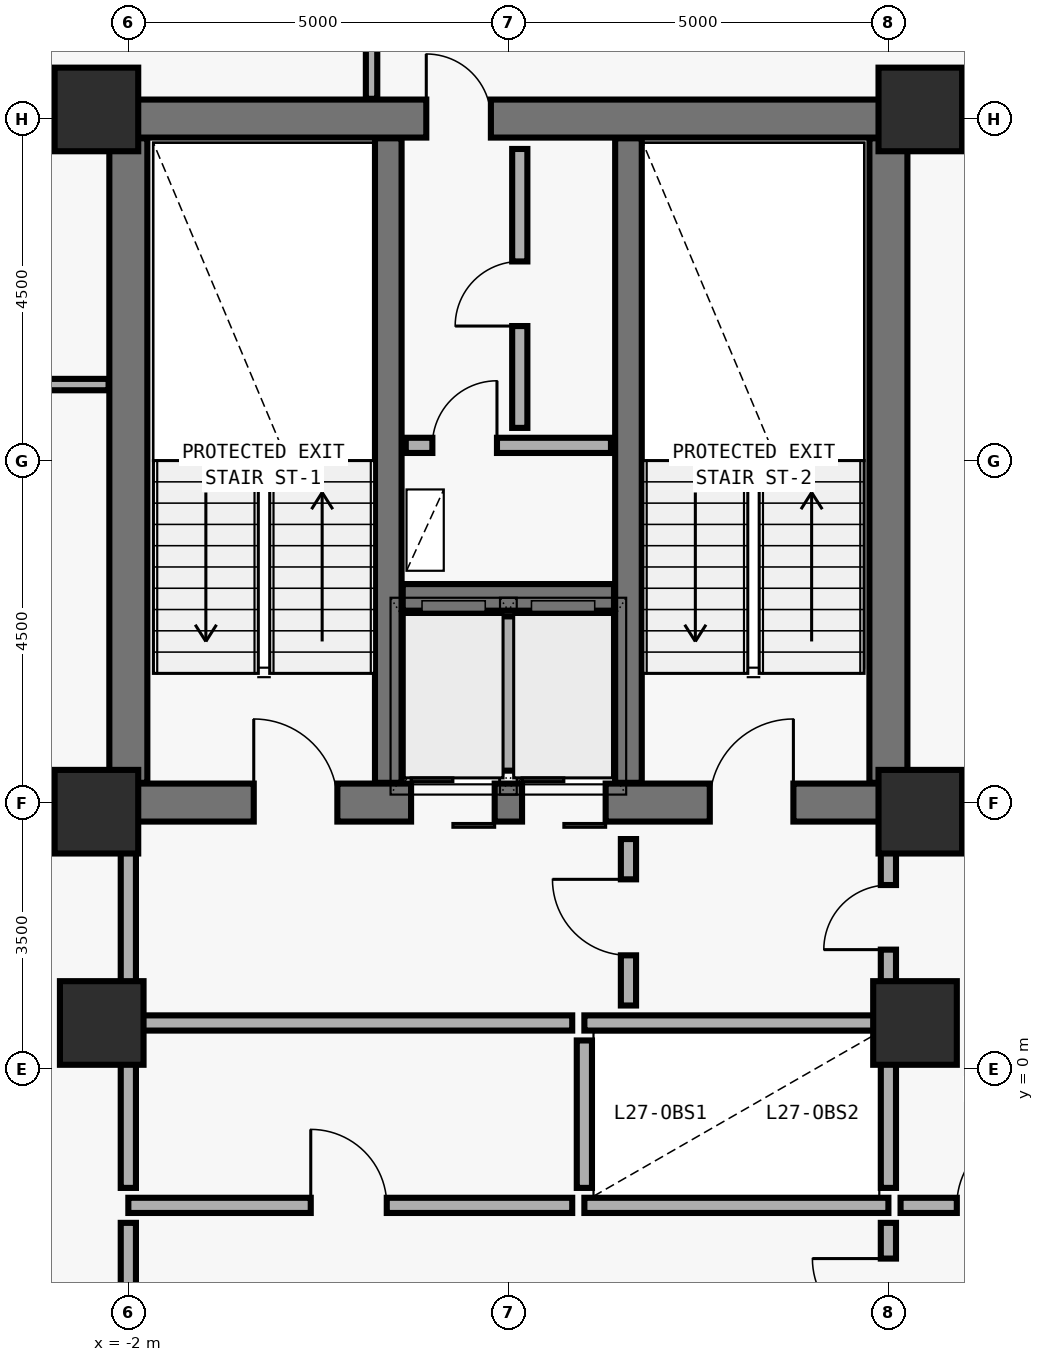
"""IFC4 building model, lengths in metres.
Left out: names, types, materials, properties, quantities, classifications, styles, units other than length and angle.
Written with IfcOpenShell. Run it as: python <this file> out.ifc"""

import sys

from ifc_helpers import new_model, si_unit, direction, frame, frame_2d, origin, origin_2d, place, context, subcontext, project, spatial, rectangle, extrude, element, fill, save


model = new_model("IFC4")
c1 = context("Model", 3, precision=1e-05, world=origin(), true_north=direction((0.0, 1.0)))
c2 = subcontext(c1, "Body", "Model", "MODEL_VIEW")
j1 = project(units=[si_unit("LENGTHUNIT", "METRE"), si_unit("PLANEANGLEUNIT", "RADIAN")], contexts=[c1])
p1 = place(None, origin())
s1 = spatial("IfcSite", under=j1, at=p1, CompositionType="ELEMENT")
p2 = place(p1, origin())
s2 = spatial("IfcBuilding", under=s1, at=p2, CompositionType="ELEMENT")
p3 = place(p2, frame((0.0, 0.0, 111.0)))
s3 = spatial("IfcBuildingStorey", under=s2, at=p3, CompositionType="ELEMENT", Elevation=111.0)
p4 = place(p3, frame((-2.0, 3.5, 0.0), z_axis=(0.0, 0.0, 1.0), x_axis=(1.0, 0.0, 0.0)))
e1 = element("IfcWall", 1, at=p4, inside=s3, PredefinedType="SHEAR", context=c2, shape_type="SweptSolid", body=[
    extrude(rectangle(XDim=10.0, YDim=0.5, at=frame_2d((5.0, 0.0))), origin(), (0.0, 0.0, 1.0), 3.892),
])
p5 = place(p4, frame((1.65, 0.0, 0.0)))
e2 = element("IfcOpeningElement", 2, at=p5, cuts=e1, PredefinedType="OPENING", context=c2, shape_type="SweptSolid", body=[
    extrude(rectangle(XDim=1.1, YDim=2.15, at=frame_2d((0.55, 1.075))), frame((0.0, 0.26, 0.0), z_axis=(0.0, -1.0, 0.0), x_axis=(1.0, 0.0, 0.0)), (0.0, 0.0, 1.0), 0.52),
])
p6 = place(p4, frame((7.65, 0.0, 0.0)))
e3 = element("IfcOpeningElement", 3, at=p6, cuts=e1, PredefinedType="OPENING", context=c2, shape_type="SweptSolid", body=[
    extrude(rectangle(XDim=1.1, YDim=2.15, at=frame_2d((0.55, 1.075))), frame((0.0, 0.26, 0.0), z_axis=(0.0, -1.0, 0.0), x_axis=(1.0, 0.0, 0.0)), (0.0, 0.0, 1.0), 0.52),
])
p7 = place(p4, frame((3.72, 0.0, 0.0)))
e4 = element("IfcOpeningElement", 4, at=p7, cuts=e1, PredefinedType="OPENING", context=c2, shape_type="SweptSolid", body=[
    extrude(rectangle(XDim=1.1, YDim=2.2, at=frame_2d((0.55, 1.1))), frame((0.0, 0.26, 0.0), z_axis=(0.0, -1.0, 0.0), x_axis=(1.0, 0.0, 0.0)), (0.0, 0.0, 1.0), 0.52),
])
p8 = place(p4, frame((5.18, 0.0, 0.0)))
e5 = element("IfcOpeningElement", 5, at=p8, cuts=e1, PredefinedType="OPENING", context=c2, shape_type="SweptSolid", body=[
    extrude(rectangle(XDim=1.1, YDim=2.2, at=frame_2d((0.55, 1.1))), frame((0.0, 0.26, 0.0), z_axis=(0.0, -1.0, 0.0), x_axis=(1.0, 0.0, 0.0)), (0.0, 0.0, 1.0), 0.52),
])
p9 = place(p3, frame((-2.0, 12.5, 0.0), z_axis=(0.0, 0.0, 1.0), x_axis=(1.0, 0.0, 0.0)))
e6 = element("IfcWall", 6, at=p9, inside=s3, PredefinedType="SHEAR", context=c2, shape_type="SweptSolid", body=[
    extrude(rectangle(XDim=10.0, YDim=0.5, at=frame_2d((5.0, 0.0))), origin(), (0.0, 0.0, 1.0), 3.892),
])
p10 = place(p9, frame((3.92, 0.0, 0.0)))
e7 = element("IfcOpeningElement", 7, at=p10, cuts=e6, PredefinedType="OPENING", context=c2, shape_type="SweptSolid", body=[
    extrude(rectangle(XDim=0.85, YDim=2.1, at=frame_2d((0.425, 1.05))), frame((0.0, 0.26, 0.0), z_axis=(0.0, -1.0, 0.0), x_axis=(1.0, 0.0, 0.0)), (0.0, 0.0, 1.0), 0.52),
])
for number, where, z_axis, x_axis in (
    (8, (-2.0, 3.76, 0.0), (0.0, 0.0, 1.0), (0.0, 1.0, 0.0)),
    (9, (8.0, 3.76, 0.0), (0.0, 0.0, 1.0), (0.0, 1.0, 0.0)),
):
    element("IfcWall", number, at=place(p3, frame(where, z_axis=z_axis, x_axis=x_axis)), inside=s3, PredefinedType="SHEAR", context=c2, shape_type="SweptSolid", body=[
        extrude(rectangle(XDim=8.48, YDim=0.5, at=frame_2d((4.24, 0.0))), origin(), (0.0, 0.0, 1.0), 3.892),
    ])
for number, where, z_axis, x_axis in (
    (10, (1.42, 3.76, 0.0), (0.0, 0.0, 1.0), (0.0, 1.0, 0.0)),
    (11, (4.58, 3.76, 0.0), (0.0, 0.0, 1.0), (0.0, 1.0, 0.0)),
):
    element("IfcWall", number, at=place(p3, frame(where, z_axis=z_axis, x_axis=x_axis)), inside=s3, PredefinedType="SHEAR", context=c2, shape_type="SweptSolid", body=[
        extrude(rectangle(XDim=8.48, YDim=0.35, at=frame_2d((4.24, 0.0))), origin(), (0.0, 0.0, 1.0), 3.892),
    ])
p11 = place(p3, frame((1.61, 6.2, 0.0), z_axis=(0.0, 0.0, 1.0), x_axis=(1.0, 0.0, 0.0)))
e12 = element("IfcWall", 12, at=p11, inside=s3, PredefinedType="SHEAR", context=c2, shape_type="SweptSolid", body=[
    extrude(rectangle(XDim=2.78, YDim=0.35, at=frame_2d((1.39, 0.0))), origin(), (0.0, 0.0, 1.0), 3.892),
])
for number, where, z_axis, x_axis in (
    (13, (-2.42, 12.62, 0.0), (0.0, 0.0, 1.0), (1.0, 0.0, 0.0)),
    (14, (8.42, 12.62, 0.0), (0.0, 0.0, 1.0), (1.0, 0.0, 0.0)),
    (15, (-2.42, 3.38, 0.0), (0.0, 0.0, 1.0), (1.0, 0.0, 0.0)),
    (16, (8.42, 3.38, 0.0), (0.0, 0.0, 1.0), (1.0, 0.0, 0.0)),
    (17, (-2.35, 0.6, 0.0), (0.0, 0.0, 1.0), (1.0, 0.0, 0.0)),
    (18, (8.35, 0.6, 0.0), (0.0, 0.0, 1.0), (1.0, 0.0, 0.0)),
):
    element("IfcColumn", number, at=place(p3, frame(where, z_axis=z_axis, x_axis=x_axis)), inside=s3, PredefinedType="COLUMN", context=c2, shape_type="SweptSolid", body=[
        extrude(rectangle(XDim=1.1, YDim=1.1, at=origin_2d()), origin(), (0.0, 0.0, 1.0), 3.875),
    ])
p12 = place(p3, frame((3.0, 3.92, 0.0), z_axis=(0.0, 0.0, 1.0), x_axis=(0.0, 1.0, 0.0)))
e19 = element("IfcWall", 19, at=p12, inside=s3, PredefinedType="SOLIDWALL", context=c2, shape_type="SweptSolid", body=[
    extrude(rectangle(XDim=2.03, YDim=0.2, at=frame_2d((1.015, 0.0))), origin(), (0.0, 0.0, 1.0), 3.64),
])
p13 = place(p3, frame((4.0, 0.6, 0.0), z_axis=(0.0, 0.0, 1.0), x_axis=(1.0, 0.0, 0.0)))
e20 = element("IfcWall", 20, at=p13, inside=s3, PredefinedType="SOLIDWALL", context=c2, shape_type="SweptSolid", body=[
    extrude(rectangle(XDim=3.88, YDim=0.2, at=frame_2d((1.94, 0.0))), origin(), (0.0, 0.0, 1.0), 3.172),
])
p14 = place(p3, frame((4.0, -1.8, 0.0), z_axis=(0.0, 0.0, 1.0), x_axis=(1.0, 0.0, 0.0)))
e21 = element("IfcWall", 21, at=p14, inside=s3, PredefinedType="SOLIDWALL", context=c2, shape_type="SweptSolid", body=[
    extrude(rectangle(XDim=4.0, YDim=0.2, at=frame_2d((2.0, 0.0))), origin(), (0.0, 0.0, 1.0), 3.64),
])
p15 = place(p3, frame((4.0, -1.57, 0.0), z_axis=(0.0, 0.0, 1.0), x_axis=(0.0, 1.0, 0.0)))
e22 = element("IfcWall", 22, at=p15, inside=s3, PredefinedType="SOLIDWALL", context=c2, shape_type="SweptSolid", body=[
    extrude(rectangle(XDim=1.94, YDim=0.2, at=frame_2d((0.97, 0.0))), origin(), (0.0, 0.0, 1.0), 3.64),
])
p16 = place(p3, frame((8.0, -1.57, 0.0), z_axis=(0.0, 0.0, 1.0), x_axis=(0.0, 1.0, 0.0)))
e23 = element("IfcWall", 23, at=p16, inside=s3, PredefinedType="SOLIDWALL", context=c2, shape_type="SweptSolid", body=[
    extrude(rectangle(XDim=2.05, YDim=0.2, at=frame_2d((1.025, 0.0))), origin(), (0.0, 0.0, 1.0), 3.072),
])
p17 = place(p3, frame((1.65, 8.2, 0.0), z_axis=(0.0, 0.0, 1.0), x_axis=(1.0, 0.0, 0.0)))
e24 = element("IfcWall", 24, at=p17, inside=s3, PredefinedType="MOVABLE", context=c2, shape_type="SweptSolid", body=[
    extrude(rectangle(XDim=2.7, YDim=0.2, at=frame_2d((1.35, 0.0))), origin(), (0.0, 0.0, 1.0), 3.64),
])
p18 = place(p17, frame((0.35, 0.0, 0.0)))
e25 = element("IfcOpeningElement", 25, at=p18, cuts=e24, PredefinedType="OPENING", context=c2, shape_type="SweptSolid", body=[
    extrude(rectangle(XDim=0.85, YDim=2.1, at=frame_2d((0.425, 1.05))), frame((0.0, 0.11, 0.0), z_axis=(0.0, -1.0, 0.0), x_axis=(1.0, 0.0, 0.0)), (0.0, 0.0, 1.0), 0.22),
])
p19 = place(p3, frame((3.15, 8.43, 0.0), z_axis=(0.0, 0.0, 1.0), x_axis=(0.0, 1.0, 0.0)))
e26 = element("IfcWall", 26, at=p19, inside=s3, PredefinedType="MOVABLE", context=c2, shape_type="SweptSolid", body=[
    extrude(rectangle(XDim=3.67, YDim=0.2, at=frame_2d((1.835, 0.0))), origin(), (0.0, 0.0, 1.0), 3.64),
])
p20 = place(p19, frame((1.34, 0.0, 0.0)))
e27 = element("IfcOpeningElement", 27, at=p20, cuts=e26, PredefinedType="OPENING", context=c2, shape_type="SweptSolid", body=[
    extrude(rectangle(XDim=0.85, YDim=2.1, at=frame_2d((0.425, 1.05))), frame((0.0, 0.11, 0.0), z_axis=(0.0, -1.0, 0.0), x_axis=(1.0, 0.0, 0.0)), (0.0, 0.0, 1.0), 0.22),
])
p21 = place(p3, frame((4.58, 0.83, 0.0), z_axis=(0.0, 0.0, 1.0), x_axis=(0.0, 1.0, 0.0)))
e28 = element("IfcWall", 28, at=p21, inside=s3, PredefinedType="MOVABLE", context=c2, shape_type="SweptSolid", body=[
    extrude(rectangle(XDim=2.19, YDim=0.2, at=frame_2d((1.095, 0.0))), origin(), (0.0, 0.0, 1.0), 3.64),
])
p22 = place(p21, frame((0.66, 0.0, 0.0)))
e29 = element("IfcOpeningElement", 29, at=p22, cuts=e28, PredefinedType="OPENING", context=c2, shape_type="SweptSolid", body=[
    extrude(rectangle(XDim=1.0, YDim=2.1, at=frame_2d((0.5, 1.05))), frame((0.0, 0.11, 0.0), z_axis=(0.0, -1.0, 0.0), x_axis=(1.0, 0.0, 0.0)), (0.0, 0.0, 1.0), 0.22),
])
p23 = place(p3, frame((8.0, 0.72, 0.0), z_axis=(0.0, 0.0, 1.0), x_axis=(0.0, 1.0, 0.0)))
e30 = element("IfcWall", 30, at=p23, inside=s3, PredefinedType="MOVABLE", context=c2, shape_type="SweptSolid", body=[
    extrude(rectangle(XDim=2.3, YDim=0.2, at=frame_2d((1.15, 0.0))), origin(), (0.0, 0.0, 1.0), 2.872),
])
p24 = place(p23, frame((0.845, 0.0, 0.0)))
e31 = element("IfcOpeningElement", 31, at=p24, cuts=e30, PredefinedType="OPENING", context=c2, shape_type="SweptSolid", body=[
    extrude(rectangle(XDim=0.85, YDim=2.1, at=frame_2d((0.425, 1.05))), frame((0.0, 0.11, 0.0), z_axis=(0.0, -1.0, 0.0), x_axis=(1.0, 0.0, 0.0)), (0.0, 0.0, 1.0), 0.22),
])
p25 = place(p3, frame((8.0, -3.97, 0.0), z_axis=(0.0, 0.0, 1.0), x_axis=(0.0, 1.0, 0.0)))
e32 = element("IfcWall", 32, at=p25, inside=s3, PredefinedType="MOVABLE", context=c2, shape_type="SweptSolid", body=[
    extrude(rectangle(XDim=1.94, YDim=0.2, at=frame_2d((0.97, 0.0))), origin(), (0.0, 0.0, 1.0), 3.072),
])
p26 = place(p25, frame((0.47, 0.0, 0.0)))
e33 = element("IfcOpeningElement", 33, at=p26, cuts=e32, PredefinedType="OPENING", context=c2, shape_type="SweptSolid", body=[
    extrude(rectangle(XDim=1.0, YDim=2.1, at=frame_2d((0.5, 1.05))), frame((0.0, 0.11, 0.0), z_axis=(0.0, -1.0, 0.0), x_axis=(1.0, 0.0, 0.0)), (0.0, 0.0, 1.0), 0.22),
])
p27 = place(p3, frame((-2.0, -1.8, 0.0), z_axis=(0.0, 0.0, 1.0), x_axis=(1.0, 0.0, 0.0)))
e34 = element("IfcWall", 34, at=p27, inside=s3, PredefinedType="MOVABLE", context=c2, shape_type="SweptSolid", body=[
    extrude(rectangle(XDim=5.84, YDim=0.2, at=frame_2d((2.92, 0.0))), origin(), (0.0, 0.0, 1.0), 3.64),
])
p28 = place(p27, frame((2.4, 0.0, 0.0)))
e35 = element("IfcOpeningElement", 35, at=p28, cuts=e34, PredefinedType="OPENING", context=c2, shape_type="SweptSolid", body=[
    extrude(rectangle(XDim=1.0, YDim=2.1, at=frame_2d((0.5, 1.05))), frame((0.0, 0.11, 0.0), z_axis=(0.0, -1.0, 0.0), x_axis=(1.0, 0.0, 0.0)), (0.0, 0.0, 1.0), 0.22),
])
p29 = place(p3, frame((8.16, -1.8, 0.0), z_axis=(0.0, 0.0, 1.0), x_axis=(1.0, 0.0, 0.0)))
e36 = element("IfcWall", 36, at=p29, inside=s3, PredefinedType="MOVABLE", context=c2, shape_type="SweptSolid", body=[
    extrude(rectangle(XDim=2.64, YDim=0.2, at=frame_2d((1.32, 0.0))), origin(), (0.0, 0.0, 1.0), 3.64),
])
p30 = place(p29, frame((0.74, 0.0, 0.0)))
e37 = element("IfcOpeningElement", 37, at=p30, cuts=e36, PredefinedType="OPENING", context=c2, shape_type="SweptSolid", body=[
    extrude(rectangle(XDim=1.0, YDim=2.1, at=frame_2d((0.5, 1.05))), frame((0.0, 0.11, 0.0), z_axis=(0.0, -1.0, 0.0), x_axis=(1.0, 0.0, 0.0)), (0.0, 0.0, 1.0), 0.22),
])
p31 = place(p3, frame((-1.88, 0.6, 0.0), z_axis=(0.0, 0.0, 1.0), x_axis=(1.0, 0.0, 0.0)))
e38 = element("IfcWall", 38, at=p31, inside=s3, PredefinedType="MOVABLE", context=c2, shape_type="SweptSolid", body=[
    extrude(rectangle(XDim=5.72, YDim=0.2, at=frame_2d((2.86, 0.0))), origin(), (0.0, 0.0, 1.0), 3.172),
])
p32 = place(p3, frame((-2.0, 0.72, 0.0), z_axis=(0.0, 0.0, 1.0), x_axis=(0.0, 1.0, 0.0)))
e39 = element("IfcWall", 39, at=p32, inside=s3, PredefinedType="MOVABLE", context=c2, shape_type="SweptSolid", body=[
    extrude(rectangle(XDim=2.3, YDim=0.2, at=frame_2d((1.15, 0.0))), origin(), (0.0, 0.0, 1.0), 2.872),
])
p33 = place(p3, frame((-2.0, -3.97, 0.0), z_axis=(0.0, 0.0, 1.0), x_axis=(0.0, 1.0, 0.0)))
e40 = element("IfcWall", 40, at=p33, inside=s3, PredefinedType="MOVABLE", context=c2, shape_type="SweptSolid", body=[
    extrude(rectangle(XDim=1.94, YDim=0.2, at=frame_2d((0.97, 0.0))), origin(), (0.0, 0.0, 1.0), 3.022),
])
p34 = place(p3, frame((-2.0, -1.57, 0.0), z_axis=(0.0, 0.0, 1.0), x_axis=(0.0, 1.0, 0.0)))
e41 = element("IfcWall", 41, at=p34, inside=s3, PredefinedType="MOVABLE", context=c2, shape_type="SweptSolid", body=[
    extrude(rectangle(XDim=2.05, YDim=0.2, at=frame_2d((1.025, 0.0))), origin(), (0.0, 0.0, 1.0), 3.022),
])
p35 = place(p3, frame((-4.465, 9.0, 0.0), z_axis=(0.0, 0.0, 1.0), x_axis=(1.0, 0.0, 0.0)))
e42 = element("IfcWall", 42, at=p35, inside=s3, PredefinedType="PARTITIONING", context=c2, shape_type="SweptSolid", body=[
    extrude(rectangle(XDim=2.205, YDim=0.15, at=frame_2d((1.103, 0.0))), origin(), (0.0, 0.0, 1.0), 3.64),
])
p36 = place(p3, frame((1.2, 14.615, 0.0), z_axis=(0.0, 0.0, 1.0), x_axis=(0.0, -1.0, 0.0)))
e43 = element("IfcWall", 43, at=p36, inside=s3, PredefinedType="PARTITIONING", context=c2, shape_type="SweptSolid", body=[
    extrude(rectangle(XDim=1.855, YDim=0.15, at=frame_2d((0.927, 0.0))), origin(), (0.0, 0.0, 1.0), 3.64),
])
p37 = place(p5, origin())
e44 = element("IfcDoor", 44, at=p37, inside=s3, OperationType="SINGLE_SWING_LEFT", PredefinedType="DOOR", context=c2, shape_type="SweptSolid", body=[
    extrude(rectangle(XDim=1.1, YDim=2.15, at=frame_2d((0.55, 1.075))), frame((0.0, 0.025, 0.0), z_axis=(0.0, -1.0, 0.0), x_axis=(1.0, 0.0, 0.0)), (0.0, 0.0, 1.0), 0.05),
])
fill(e2, e44)
p38 = place(p6, origin())
e45 = element("IfcDoor", 45, at=p38, inside=s3, OperationType="SINGLE_SWING_RIGHT", PredefinedType="DOOR", context=c2, shape_type="SweptSolid", body=[
    extrude(rectangle(XDim=1.1, YDim=2.15, at=frame_2d((0.55, 1.075))), frame((0.0, 0.025, 0.0), z_axis=(0.0, -1.0, 0.0), x_axis=(1.0, 0.0, 0.0)), (0.0, 0.0, 1.0), 0.05),
])
fill(e3, e45)
p39 = place(p7, origin())
e46 = element("IfcDoor", 46, at=p39, inside=s3, OperationType="DOUBLE_DOOR_SLIDING", PredefinedType="DOOR", context=c2, shape_type="SweptSolid", body=[
    extrude(rectangle(XDim=1.1, YDim=2.2, at=frame_2d((0.55, 1.1))), frame((0.0, 0.025, 0.0), z_axis=(0.0, -1.0, 0.0), x_axis=(1.0, 0.0, 0.0)), (0.0, 0.0, 1.0), 0.05),
])
fill(e4, e46)
p40 = place(p8, origin())
e47 = element("IfcDoor", 47, at=p40, inside=s3, OperationType="DOUBLE_DOOR_SLIDING", PredefinedType="DOOR", context=c2, shape_type="SweptSolid", body=[
    extrude(rectangle(XDim=1.1, YDim=2.2, at=frame_2d((0.55, 1.1))), frame((0.0, 0.025, 0.0), z_axis=(0.0, -1.0, 0.0), x_axis=(1.0, 0.0, 0.0)), (0.0, 0.0, 1.0), 0.05),
])
fill(e5, e47)
p41 = place(p10, origin())
e48 = element("IfcDoor", 48, at=p41, inside=s3, OperationType="SINGLE_SWING_LEFT", PredefinedType="DOOR", context=c2, shape_type="SweptSolid", body=[
    extrude(rectangle(XDim=0.85, YDim=2.1, at=frame_2d((0.425, 1.05))), frame((0.0, 0.025, 0.0), z_axis=(0.0, -1.0, 0.0), x_axis=(1.0, 0.0, 0.0)), (0.0, 0.0, 1.0), 0.05),
])
fill(e7, e48)
p42 = place(p18, origin())
e49 = element("IfcDoor", 49, at=p42, inside=s3, OperationType="SINGLE_SWING_RIGHT", PredefinedType="DOOR", context=c2, shape_type="SweptSolid", body=[
    extrude(rectangle(XDim=0.85, YDim=2.1, at=frame_2d((0.425, 1.05))), frame((0.0, 0.025, 0.0), z_axis=(0.0, -1.0, 0.0), x_axis=(1.0, 0.0, 0.0)), (0.0, 0.0, 1.0), 0.05),
])
fill(e25, e49)
p43 = place(p20, origin())
e50 = element("IfcDoor", 50, at=p43, inside=s3, OperationType="SINGLE_SWING_LEFT", PredefinedType="DOOR", context=c2, shape_type="SweptSolid", body=[
    extrude(rectangle(XDim=0.85, YDim=2.1, at=frame_2d((0.425, 1.05))), frame((0.0, 0.025, 0.0), z_axis=(0.0, -1.0, 0.0), x_axis=(1.0, 0.0, 0.0)), (0.0, 0.0, 1.0), 0.05),
])
fill(e27, e50)
p44 = place(p22, origin())
e51 = element("IfcDoor", 51, at=p44, inside=s3, OperationType="SINGLE_SWING_RIGHT", PredefinedType="DOOR", context=c2, shape_type="SweptSolid", body=[
    extrude(rectangle(XDim=1.0, YDim=2.1, at=frame_2d((0.5, 1.05))), frame((0.0, 0.025, 0.0), z_axis=(0.0, -1.0, 0.0), x_axis=(1.0, 0.0, 0.0)), (0.0, 0.0, 1.0), 0.05),
])
fill(e29, e51)
p45 = place(p24, origin())
e52 = element("IfcDoor", 52, at=p45, inside=s3, OperationType="SINGLE_SWING_LEFT", PredefinedType="DOOR", context=c2, shape_type="SweptSolid", body=[
    extrude(rectangle(XDim=0.85, YDim=2.1, at=frame_2d((0.425, 1.05))), frame((0.0, 0.025, 0.0), z_axis=(0.0, -1.0, 0.0), x_axis=(1.0, 0.0, 0.0)), (0.0, 0.0, 1.0), 0.05),
])
fill(e31, e52)
p46 = place(p26, origin())
e53 = element("IfcDoor", 53, at=p46, inside=s3, OperationType="SINGLE_SWING_RIGHT", PredefinedType="DOOR", context=c2, shape_type="SweptSolid", body=[
    extrude(rectangle(XDim=1.0, YDim=2.1, at=frame_2d((0.5, 1.05))), frame((0.0, 0.025, 0.0), z_axis=(0.0, -1.0, 0.0), x_axis=(1.0, 0.0, 0.0)), (0.0, 0.0, 1.0), 0.05),
])
fill(e33, e53)
p47 = place(p28, origin())
e54 = element("IfcDoor", 54, at=p47, inside=s3, OperationType="SINGLE_SWING_LEFT", PredefinedType="DOOR", context=c2, shape_type="SweptSolid", body=[
    extrude(rectangle(XDim=1.0, YDim=2.1, at=frame_2d((0.5, 1.05))), frame((0.0, 0.025, 0.0), z_axis=(0.0, -1.0, 0.0), x_axis=(1.0, 0.0, 0.0)), (0.0, 0.0, 1.0), 0.05),
])
fill(e35, e54)
p48 = place(p30, origin())
e55 = element("IfcDoor", 55, at=p48, inside=s3, OperationType="SINGLE_SWING_RIGHT", PredefinedType="DOOR", context=c2, shape_type="SweptSolid", body=[
    extrude(rectangle(XDim=1.0, YDim=2.1, at=frame_2d((0.5, 1.05))), frame((0.0, 0.025, 0.0), z_axis=(0.0, -1.0, 0.0), x_axis=(1.0, 0.0, 0.0)), (0.0, 0.0, 1.0), 0.05),
])
fill(e37, e55)
save(model, sys.argv[1])
